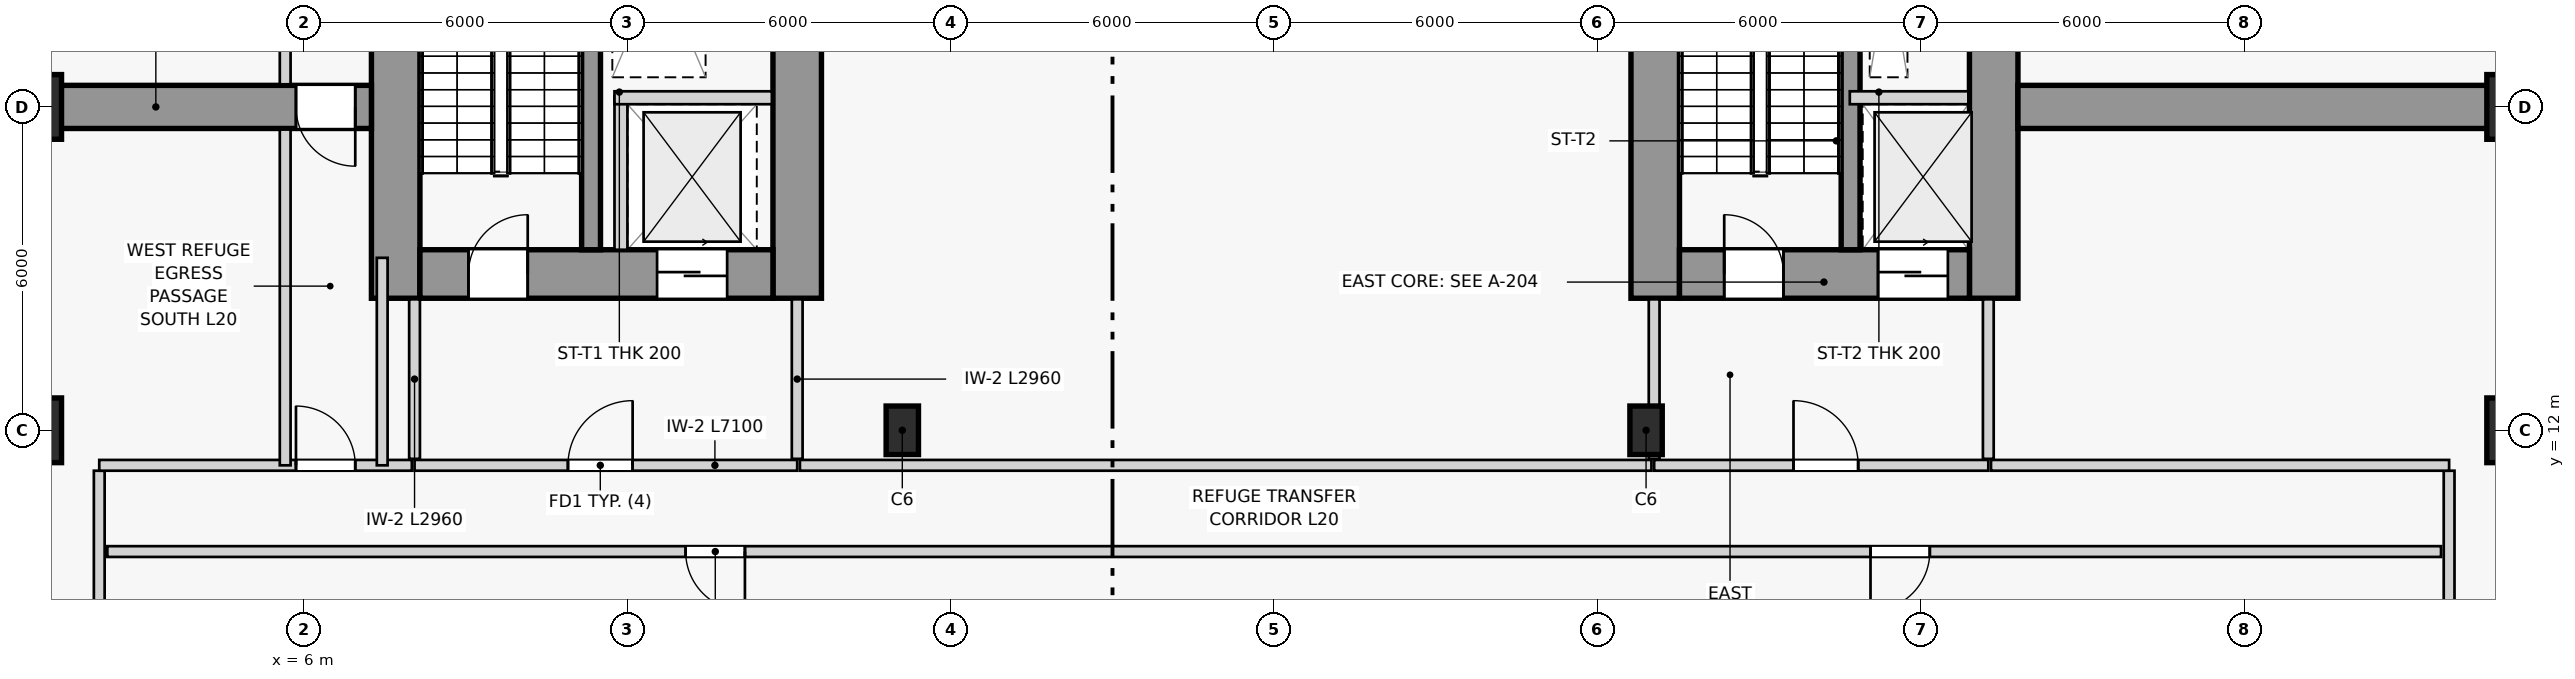
"""IFC4 building model, lengths in metres.
Left out: names, types, materials, properties, quantities, classifications, styles, units other than length and angle.
Written with IfcOpenShell. Run it as: python <this file> out.ifc"""

import sys

from ifc_helpers import new_model, si_unit, direction, frame, frame_2d, origin, origin_2d, place, context, subcontext, project, spatial, rectangle, extrude, source, transform, mapped, element, fill, save


model = new_model("IFC4")
c1 = context("Model", 3, precision=1e-05, world=origin(), true_north=direction((0.0, 1.0)))
c2 = subcontext(c1, "Body", "Model", "MODEL_VIEW")
j1 = project(units=[si_unit("LENGTHUNIT", "METRE"), si_unit("PLANEANGLEUNIT", "RADIAN")], contexts=[c1])
p1 = place(None, origin())
s1 = spatial("IfcSite", under=j1, at=p1, CompositionType="ELEMENT")
p2 = place(p1, origin())
s2 = spatial("IfcBuilding", under=s1, at=p2, CompositionType="ELEMENT")
p3 = place(p2, frame((0.0, 0.0, 76.5)))
s3 = spatial("IfcBuildingStorey", under=s2, at=p3, CompositionType="ELEMENT", Elevation=76.5)
p4 = place(p3, frame((7.7, 14.45, 0.0), z_axis=(0.0, 0.0, 1.0), x_axis=(0.0, 1.0, 0.0)))
e1 = element("IfcWall", 1, at=p4, inside=s3, PredefinedType="SHEAR", context=c2, shape_type="SweptSolid", body=[
    extrude(rectangle(XDim=13.15, YDim=0.9, at=frame_2d((6.575, 0.0))), origin(), (0.0, 0.0, 1.0), 7.2),
])
p5 = place(p3, frame((15.15, 14.45, 0.0), z_axis=(0.0, 0.0, 1.0), x_axis=(0.0, 1.0, 0.0)))
e2 = element("IfcWall", 2, at=p5, inside=s3, PredefinedType="SHEAR", context=c2, shape_type="SweptSolid", body=[
    extrude(rectangle(XDim=13.15, YDim=0.9, at=frame_2d((6.575, 0.0))), origin(), (0.0, 0.0, 1.0), 7.2),
])
p6 = place(p5, frame((5.65, 0.0, 0.0)))
e3 = element("IfcOpeningElement", 3, at=p6, cuts=e2, PredefinedType="OPENING", context=c2, shape_type="SweptSolid", body=[
    extrude(rectangle(XDim=1.1, YDim=2.2, at=frame_2d((0.55, 1.1))), frame((0.0, 0.46, 0.0), z_axis=(0.0, -1.0, 0.0), x_axis=(1.0, 0.0, 0.0)), (0.0, 0.0, 1.0), 0.92),
])
p7 = place(p3, frame((8.15, 14.9, 0.0), z_axis=(0.0, 0.0, 1.0), x_axis=(1.0, 0.0, 0.0)))
e4 = element("IfcWall", 4, at=p7, inside=s3, PredefinedType="SHEAR", context=c2, shape_type="SweptSolid", body=[
    extrude(rectangle(XDim=6.55, YDim=0.9, at=frame_2d((3.275, 0.0))), origin(), (0.0, 0.0, 1.0), 7.2),
])
p8 = place(p7, frame((0.9, 0.0, 0.0)))
e5 = element("IfcOpeningElement", 5, at=p8, cuts=e4, PredefinedType="OPENING", context=c2, shape_type="SweptSolid", body=[
    extrude(rectangle(XDim=1.1, YDim=2.2, at=frame_2d((0.55, 1.1))), frame((0.0, 0.46, 0.0), z_axis=(0.0, -1.0, 0.0), x_axis=(1.0, 0.0, 0.0)), (0.0, 0.0, 1.0), 0.92),
])
p9 = place(p7, frame((4.4, 0.0, 0.0)))
e6 = element("IfcOpeningElement", 6, at=p9, cuts=e4, PredefinedType="OPENING", context=c2, shape_type="SweptSolid", body=[
    extrude(rectangle(XDim=1.3, YDim=2.2, at=frame_2d((0.65, 1.1))), frame((0.0, 0.46, 0.0), z_axis=(0.0, -1.0, 0.0), x_axis=(1.0, 0.0, 0.0)), (0.0, 0.0, 1.0), 0.92),
])
p10 = place(p3, frame((31.07, 14.45, 0.0), z_axis=(0.0, 0.0, 1.0), x_axis=(0.0, 1.0, 0.0)))
e7 = element("IfcWall", 7, at=p10, inside=s3, PredefinedType="SHEAR", context=c2, shape_type="SweptSolid", body=[
    extrude(rectangle(XDim=13.15, YDim=0.9, at=frame_2d((6.575, 0.0))), origin(), (0.0, 0.0, 1.0), 7.2),
])
p11 = place(p3, frame((37.35, 14.45, 0.0), z_axis=(0.0, 0.0, 1.0), x_axis=(0.0, 1.0, 0.0)))
e8 = element("IfcWall", 8, at=p11, inside=s3, PredefinedType="SHEAR", context=c2, shape_type="SweptSolid", body=[
    extrude(rectangle(XDim=13.15, YDim=0.9, at=frame_2d((6.575, 0.0))), origin(), (0.0, 0.0, 1.0), 7.2),
])
p12 = place(p11, frame((5.65, 0.0, 0.0)))
e9 = element("IfcOpeningElement", 9, at=p12, cuts=e8, PredefinedType="OPENING", context=c2, shape_type="SweptSolid", body=[
    extrude(rectangle(XDim=1.1, YDim=2.2, at=frame_2d((0.55, 1.1))), frame((0.0, 0.46, 0.0), z_axis=(0.0, -1.0, 0.0), x_axis=(1.0, 0.0, 0.0)), (0.0, 0.0, 1.0), 0.92),
])
p13 = place(p3, frame((31.52, 14.9, 0.0), z_axis=(0.0, 0.0, 1.0), x_axis=(1.0, 0.0, 0.0)))
e10 = element("IfcWall", 10, at=p13, inside=s3, PredefinedType="SHEAR", context=c2, shape_type="SweptSolid", body=[
    extrude(rectangle(XDim=5.38, YDim=0.9, at=frame_2d((2.69, 0.0))), origin(), (0.0, 0.0, 1.0), 7.2),
])
p14 = place(p13, frame((0.83, 0.0, 0.0)))
e11 = element("IfcOpeningElement", 11, at=p14, cuts=e10, PredefinedType="OPENING", context=c2, shape_type="SweptSolid", body=[
    extrude(rectangle(XDim=1.1, YDim=2.2, at=frame_2d((0.55, 1.1))), frame((0.0, 0.46, 0.0), z_axis=(0.0, -1.0, 0.0), x_axis=(1.0, 0.0, 0.0)), (0.0, 0.0, 1.0), 0.92),
])
p15 = place(p13, frame((3.68, 0.0, 0.0)))
e12 = element("IfcOpeningElement", 12, at=p15, cuts=e10, PredefinedType="OPENING", context=c2, shape_type="SweptSolid", body=[
    extrude(rectangle(XDim=1.3, YDim=2.2, at=frame_2d((0.65, 1.1))), frame((0.0, 0.46, 0.0), z_axis=(0.0, -1.0, 0.0), x_axis=(1.0, 0.0, 0.0)), (0.0, 0.0, 1.0), 0.92),
])
for number, where, z_axis, x_axis in (
    (13, (11.325, 15.35, 0.0), (0.0, 0.0, 1.0), (0.0, 1.0, 0.0)),
    (14, (34.695, 15.35, 0.0), (0.0, 0.0, 1.0), (0.0, 1.0, 0.0)),
):
    element("IfcWall", number, at=place(p3, frame(where, z_axis=z_axis, x_axis=x_axis)), inside=s3, PredefinedType="SHEAR", context=c2, shape_type="SweptSolid", body=[
        extrude(rectangle(XDim=7.75, YDim=0.35, at=frame_2d((3.875, 0.0))), origin(), (0.0, 0.0, 1.0), 7.2),
    ])
m1 = source(origin(), c2, "Body", "SweptSolid", [
    extrude(rectangle(XDim=1.2, YDim=1.2, at=origin_2d()), origin(), (0.0, 0.0, 1.0), 7.2),
])
for number, where, z_axis, x_axis in (
    (15, (0.9, 12.0, 0.0), (0.0, 0.0, 1.0), (1.0, 0.0, 0.0)),
    (16, (47.1, 12.0, 0.0), (0.0, 0.0, 1.0), (1.0, 0.0, 0.0)),
    (17, (0.9, 18.0, 0.0), (0.0, 0.0, 1.0), (1.0, 0.0, 0.0)),
    (18, (47.1, 18.0, 0.0), (0.0, 0.0, 1.0), (1.0, 0.0, 0.0)),
):
    element("IfcColumn", number, at=place(p3, frame(where, z_axis=z_axis, x_axis=x_axis)), inside=s3, PredefinedType="COLUMN", context=c2, shape_type="MappedRepresentation", body=[
        mapped(m1, transform((0.0, 0.0, 0.0), scale=1.0)),
    ])
m2 = source(origin(), c2, "Body", "SweptSolid", [
    extrude(rectangle(XDim=0.6, YDim=0.9, at=origin_2d()), origin(), (0.0, 0.0, 1.0), 7.2),
])
for number, where, z_axis, x_axis in (
    (19, (17.1, 12.0, 0.0), (0.0, 0.0, 1.0), (1.0, 0.0, 0.0)),
    (20, (30.9, 12.0, 0.0), (0.0, 0.0, 1.0), (1.0, 0.0, 0.0)),
):
    element("IfcColumn", number, at=place(p3, frame(where, z_axis=z_axis, x_axis=x_axis)), inside=s3, PredefinedType="COLUMN", context=c2, shape_type="MappedRepresentation", body=[
        mapped(m2, transform((0.0, 0.0, 0.0), scale=1.0)),
    ])
p16 = place(p3, frame((0.65, 18.0, 0.0), z_axis=(0.0, 0.0, 1.0), x_axis=(1.0, 0.0, 0.0)))
e21 = element("IfcWall", 21, at=p16, inside=s3, PredefinedType="SOLIDWALL", context=c2, shape_type="SweptSolid", body=[
    extrude(rectangle(XDim=6.6, YDim=0.8, at=frame_2d((3.3, 0.0))), origin(), (0.0, 0.0, 1.0), 6.55),
])
p17 = place(p16, frame((5.2, 0.0, 0.0)))
e22 = element("IfcOpeningElement", 22, at=p17, cuts=e21, PredefinedType="OPENING", context=c2, shape_type="SweptSolid", body=[
    extrude(rectangle(XDim=1.1, YDim=2.2, at=frame_2d((0.55, 1.1))), frame((0.0, 0.41, 0.0), z_axis=(0.0, -1.0, 0.0), x_axis=(1.0, 0.0, 0.0)), (0.0, 0.0, 1.0), 0.82),
])
p18 = place(p3, frame((37.8, 18.0, 0.0), z_axis=(0.0, 0.0, 1.0), x_axis=(1.0, 0.0, 0.0)))
e23 = element("IfcWall", 23, at=p18, inside=s3, PredefinedType="SOLIDWALL", context=c2, shape_type="SweptSolid", body=[
    extrude(rectangle(XDim=9.55, YDim=0.8, at=frame_2d((4.775, 0.0))), origin(), (0.0, 0.0, 1.0), 6.55),
])
p19 = place(p3, frame((11.88, 15.35, 0.0), z_axis=(0.0, 0.0, 1.0), x_axis=(0.0, 1.0, 0.0)))
e24 = element("IfcWall", 24, at=p19, inside=s3, PredefinedType="PARTITIONING", context=c2, shape_type="SweptSolid", body=[
    extrude(rectangle(XDim=2.85, YDim=0.24, at=frame_2d((1.425, 0.0))), origin(), (0.0, 0.0, 1.0), 6.55),
])
p20 = place(p3, frame((11.76, 18.17, 0.0), z_axis=(0.0, 0.0, 1.0), x_axis=(1.0, 0.0, 0.0)))
e25 = element("IfcWall", 25, at=p20, inside=s3, PredefinedType="PARTITIONING", context=c2, shape_type="SweptSolid", body=[
    extrude(rectangle(XDim=2.92, YDim=0.24, at=frame_2d((1.46, 0.0))), origin(), (0.0, 0.0, 1.0), 6.55),
])
p21 = place(p3, frame((34.68, 18.17, 0.0), z_axis=(0.0, 0.0, 1.0), x_axis=(1.0, 0.0, 0.0)))
e26 = element("IfcWall", 26, at=p21, inside=s3, PredefinedType="PARTITIONING", context=c2, shape_type="SweptSolid", body=[
    extrude(rectangle(XDim=2.2, YDim=0.24, at=frame_2d((1.1, 0.0))), origin(), (0.0, 0.0, 1.0), 6.55),
])
p22 = place(p3, frame((8.05, 11.35, 0.0), z_axis=(0.0, 0.0, 1.0), x_axis=(1.0, 0.0, 0.0)))
e27 = element("IfcWall", 27, at=p22, inside=s3, PredefinedType="PARTITIONING", context=c2, shape_type="SweptSolid", body=[
    extrude(rectangle(XDim=7.1, YDim=0.2, at=frame_2d((3.55, 0.0))), origin(), (0.0, 0.0, 1.0), 4.95),
])
p23 = place(p22, frame((2.846, 0.0, 0.0)))
e28 = element("IfcOpeningElement", 28, at=p23, cuts=e27, PredefinedType="OPENING", context=c2, shape_type="SweptSolid", body=[
    extrude(rectangle(XDim=1.2, YDim=2.2, at=frame_2d((0.6, 1.1))), frame((0.0, 0.11, 0.0), z_axis=(0.0, -1.0, 0.0), x_axis=(1.0, 0.0, 0.0)), (0.0, 0.0, 1.0), 0.22),
])
for number, where, z_axis, x_axis in (
    (29, (8.05, 11.47, 0.0), (0.0, 0.0, 1.0), (0.0, 1.0, 0.0)),
    (30, (15.15, 11.47, 0.0), (0.0, 0.0, 1.0), (0.0, 1.0, 0.0)),
):
    element("IfcWall", number, at=place(p3, frame(where, z_axis=z_axis, x_axis=x_axis)), inside=s3, PredefinedType="PARTITIONING", context=c2, shape_type="SweptSolid", body=[
        extrude(rectangle(XDim=2.96, YDim=0.2, at=frame_2d((1.48, 0.0))), origin(), (0.0, 0.0, 1.0), 6.55),
    ])
p24 = place(p3, frame((31.05, 11.35, 0.0), z_axis=(0.0, 0.0, 1.0), x_axis=(1.0, 0.0, 0.0)))
e31 = element("IfcWall", 31, at=p24, inside=s3, PredefinedType="PARTITIONING", context=c2, shape_type="SweptSolid", body=[
    extrude(rectangle(XDim=6.2, YDim=0.2, at=frame_2d((3.1, 0.0))), origin(), (0.0, 0.0, 1.0), 4.95),
])
p25 = place(p24, frame((2.586, 0.0, 0.0)))
e32 = element("IfcOpeningElement", 32, at=p25, cuts=e31, PredefinedType="OPENING", context=c2, shape_type="SweptSolid", body=[
    extrude(rectangle(XDim=1.2, YDim=2.2, at=frame_2d((0.6, 1.1))), frame((0.0, 0.11, 0.0), z_axis=(0.0, -1.0, 0.0), x_axis=(1.0, 0.0, 0.0)), (0.0, 0.0, 1.0), 0.22),
])
p26 = place(p3, frame((31.05, 11.47, 0.0), z_axis=(0.0, 0.0, 1.0), x_axis=(0.0, 1.0, 0.0)))
e33 = element("IfcWall", 33, at=p26, inside=s3, PredefinedType="PARTITIONING", context=c2, shape_type="SweptSolid", body=[
    extrude(rectangle(XDim=2.96, YDim=0.2, at=frame_2d((1.48, 0.0))), origin(), (0.0, 0.0, 1.0), 4.95),
])
p27 = place(p3, frame((37.25, 11.47, 0.0), z_axis=(0.0, 0.0, 1.0), x_axis=(0.0, 1.0, 0.0)))
e34 = element("IfcWall", 34, at=p27, inside=s3, PredefinedType="PARTITIONING", context=c2, shape_type="SweptSolid", body=[
    extrude(rectangle(XDim=2.96, YDim=0.2, at=frame_2d((1.48, 0.0))), origin(), (0.0, 0.0, 1.0), 6.55),
])
for number, where, z_axis, x_axis in (
    (35, (2.2, 2.77, 0.0), (0.0, 0.0, 1.0), (0.0, 1.0, 0.0)),
    (36, (45.8, 2.77, 0.0), (0.0, 0.0, 1.0), (0.0, 1.0, 0.0)),
):
    element("IfcWall", number, at=place(p3, frame(where, z_axis=z_axis, x_axis=x_axis)), inside=s3, PredefinedType="PARTITIONING", context=c2, shape_type="SweptSolid", body=[
        extrude(rectangle(XDim=8.48, YDim=0.2, at=frame_2d((4.24, 0.0))), origin(), (0.0, 0.0, 1.0), 6.55),
    ])
p28 = place(p3, frame((2.2, 11.35, 0.0), z_axis=(0.0, 0.0, 1.0), x_axis=(1.0, 0.0, 0.0)))
e37 = element("IfcWall", 37, at=p28, inside=s3, PredefinedType="PARTITIONING", context=c2, shape_type="SweptSolid", body=[
    extrude(rectangle(XDim=5.8, YDim=0.2, at=frame_2d((2.9, 0.0))), origin(), (0.0, 0.0, 1.0), 4.95),
])
p29 = place(p28, frame((3.65, 0.0, 0.0)))
e38 = element("IfcOpeningElement", 38, at=p29, cuts=e37, PredefinedType="OPENING", context=c2, shape_type="SweptSolid", body=[
    extrude(rectangle(XDim=1.1, YDim=2.2, at=frame_2d((0.55, 1.1))), frame((0.0, 0.11, 0.0), z_axis=(0.0, -1.0, 0.0), x_axis=(1.0, 0.0, 0.0)), (0.0, 0.0, 1.0), 0.22),
])
p30 = place(p3, frame((15.2, 11.35, 0.0), z_axis=(0.0, 0.0, 1.0), x_axis=(1.0, 0.0, 0.0)))
e39 = element("IfcWall", 39, at=p30, inside=s3, PredefinedType="PARTITIONING", context=c2, shape_type="SweptSolid", body=[
    extrude(rectangle(XDim=15.8, YDim=0.2, at=frame_2d((7.9, 0.0))), origin(), (0.0, 0.0, 1.0), 4.95),
])
p31 = place(p3, frame((37.3, 11.35, 0.0), z_axis=(0.0, 0.0, 1.0), x_axis=(1.0, 0.0, 0.0)))
e40 = element("IfcWall", 40, at=p31, inside=s3, PredefinedType="PARTITIONING", context=c2, shape_type="SweptSolid", body=[
    extrude(rectangle(XDim=8.5, YDim=0.2, at=frame_2d((4.25, 0.0))), origin(), (0.0, 0.0, 1.0), 4.95),
])
p32 = place(p3, frame((2.35, 9.75, 0.0), z_axis=(0.0, 0.0, 1.0), x_axis=(1.0, 0.0, 0.0)))
e41 = element("IfcWall", 41, at=p32, inside=s3, PredefinedType="PARTITIONING", context=c2, shape_type="SweptSolid", body=[
    extrude(rectangle(XDim=43.3, YDim=0.2, at=frame_2d((21.65, 0.0))), origin(), (0.0, 0.0, 1.0), 6.55),
])
p33 = place(p32, frame((10.73, 0.0, 0.0)))
e42 = element("IfcOpeningElement", 42, at=p33, cuts=e41, PredefinedType="OPENING", context=c2, shape_type="SweptSolid", body=[
    extrude(rectangle(XDim=1.1, YDim=2.2, at=frame_2d((0.55, 1.1))), frame((0.0, 0.11, 0.0), z_axis=(0.0, -1.0, 0.0), x_axis=(1.0, 0.0, 0.0)), (0.0, 0.0, 1.0), 0.22),
])
p34 = place(p32, frame((32.714, 0.0, 0.0)))
e43 = element("IfcOpeningElement", 43, at=p34, cuts=e41, PredefinedType="OPENING", context=c2, shape_type="SweptSolid", body=[
    extrude(rectangle(XDim=1.1, YDim=2.2, at=frame_2d((0.55, 1.1))), frame((0.0, 0.11, 0.0), z_axis=(0.0, -1.0, 0.0), x_axis=(1.0, 0.0, 0.0)), (0.0, 0.0, 1.0), 0.22),
])
p35 = place(p3, frame((5.65, 11.35, 0.0), z_axis=(0.0, 0.0, 1.0), x_axis=(0.0, 1.0, 0.0)))
e44 = element("IfcWall", 44, at=p35, inside=s3, PredefinedType="PARTITIONING", context=c2, shape_type="SweptSolid", body=[
    extrude(rectangle(XDim=6.23, YDim=0.2, at=frame_2d((3.115, 0.0))), origin(), (0.0, 0.0, 1.0), 4.95),
])
p36 = place(p3, frame((5.65, 18.42, 0.0), z_axis=(0.0, 0.0, 1.0), x_axis=(0.0, 1.0, 0.0)))
e45 = element("IfcWall", 45, at=p36, inside=s3, PredefinedType="PARTITIONING", context=c2, shape_type="SweptSolid", body=[
    extrude(rectangle(XDim=5.16, YDim=0.2, at=frame_2d((2.58, 0.0))), origin(), (0.0, 0.0, 1.0), 6.55),
])
p37 = place(p3, frame((7.45, 11.35, 0.0), z_axis=(0.0, 0.0, 1.0), x_axis=(0.0, 1.0, 0.0)))
e46 = element("IfcWall", 46, at=p37, inside=s3, PredefinedType="PARTITIONING", context=c2, shape_type="SweptSolid", body=[
    extrude(rectangle(XDim=3.85, YDim=0.2, at=frame_2d((1.925, 0.0))), origin(), (0.0, 0.0, 1.0), 6.55),
])
m3 = source(origin(), c2, "Body", "SweptSolid", [
    extrude(rectangle(XDim=1.1, YDim=2.2, at=frame_2d((0.55, 1.1))), frame((0.0, 0.025, 0.0), z_axis=(0.0, -1.0, 0.0), x_axis=(1.0, 0.0, 0.0)), (0.0, 0.0, 1.0), 0.05),
])
p38 = place(p8, origin())
e47 = element("IfcDoor", 47, at=p38, inside=s3, OperationType="SINGLE_SWING_RIGHT", PredefinedType="DOOR", context=c2, shape_type="MappedRepresentation", body=[
    mapped(m3, transform((0.0, 0.0, 0.0), scale=1.0)),
])
fill(e5, e47)
p39 = place(p14, origin())
e48 = element("IfcDoor", 48, at=p39, inside=s3, OperationType="SINGLE_SWING_LEFT", PredefinedType="DOOR", context=c2, shape_type="MappedRepresentation", body=[
    mapped(m3, transform((0.0, 0.0, 0.0), scale=1.0)),
])
fill(e11, e48)
m4 = source(origin(), c2, "Body", "SweptSolid", [
    extrude(rectangle(XDim=1.3, YDim=2.2, at=frame_2d((0.65, 1.1))), frame((0.0, 0.025, 0.0), z_axis=(0.0, -1.0, 0.0), x_axis=(1.0, 0.0, 0.0)), (0.0, 0.0, 1.0), 0.05),
])
p40 = place(p9, origin())
e49 = element("IfcDoor", 49, at=p40, inside=s3, OperationType="SLIDING_TO_RIGHT", PredefinedType="DOOR", context=c2, shape_type="MappedRepresentation", body=[
    mapped(m4, transform((0.0, 0.0, 0.0), scale=1.0)),
])
fill(e6, e49)
p41 = place(p15, origin())
e50 = element("IfcDoor", 50, at=p41, inside=s3, OperationType="SLIDING_TO_RIGHT", PredefinedType="DOOR", context=c2, shape_type="MappedRepresentation", body=[
    mapped(m4, transform((0.0, 0.0, 0.0), scale=1.0)),
])
fill(e12, e50)
m5 = source(origin(), c2, "Body", "SweptSolid", [
    extrude(rectangle(XDim=1.2, YDim=2.2, at=frame_2d((0.6, 1.1))), frame((0.0, 0.025, 0.0), z_axis=(0.0, -1.0, 0.0), x_axis=(1.0, 0.0, 0.0)), (0.0, 0.0, 1.0), 0.05),
])
p42 = place(p23, origin())
e51 = element("IfcDoor", 51, at=p42, inside=s3, OperationType="SINGLE_SWING_RIGHT", PredefinedType="DOOR", context=c2, shape_type="MappedRepresentation", body=[
    mapped(m5, transform((0.0, 0.0, 0.0), scale=1.0)),
])
fill(e28, e51)
p43 = place(p25, origin())
e52 = element("IfcDoor", 52, at=p43, inside=s3, OperationType="SINGLE_SWING_LEFT", PredefinedType="DOOR", context=c2, shape_type="MappedRepresentation", body=[
    mapped(m5, transform((0.0, 0.0, 0.0), scale=1.0)),
])
fill(e32, e52)
p44 = place(p33, frame((1.1, 0.0, 0.0), z_axis=(0.0, 0.0, 1.0), x_axis=(-1.0, 0.0, 0.0)))
e53 = element("IfcDoor", 53, at=p44, inside=s3, OperationType="SINGLE_SWING_LEFT", PredefinedType="DOOR", context=c2, shape_type="MappedRepresentation", body=[
    mapped(m3, transform((0.0, 0.0, 0.0), scale=1.0)),
])
fill(e42, e53)
p45 = place(p34, frame((1.1, 0.0, 0.0), z_axis=(0.0, 0.0, 1.0), x_axis=(-1.0, 0.0, 0.0)))
e54 = element("IfcDoor", 54, at=p45, inside=s3, OperationType="SINGLE_SWING_RIGHT", PredefinedType="DOOR", context=c2, shape_type="MappedRepresentation", body=[
    mapped(m3, transform((0.0, 0.0, 0.0), scale=1.0)),
])
fill(e43, e54)
p46 = place(p17, frame((1.1, 0.0, 0.0), z_axis=(0.0, 0.0, 1.0), x_axis=(-1.0, 0.0, 0.0)))
e55 = element("IfcDoor", 55, at=p46, inside=s3, OperationType="SINGLE_SWING_LEFT", PredefinedType="DOOR", context=c2, shape_type="MappedRepresentation", body=[
    mapped(m3, transform((0.0, 0.0, 0.0), scale=1.0)),
])
fill(e22, e55)
p47 = place(p29, origin())
e56 = element("IfcDoor", 56, at=p47, inside=s3, OperationType="SINGLE_SWING_LEFT", PredefinedType="DOOR", context=c2, shape_type="MappedRepresentation", body=[
    mapped(m3, transform((0.0, 0.0, 0.0), scale=1.0)),
])
fill(e38, e56)
save(model, sys.argv[1])
